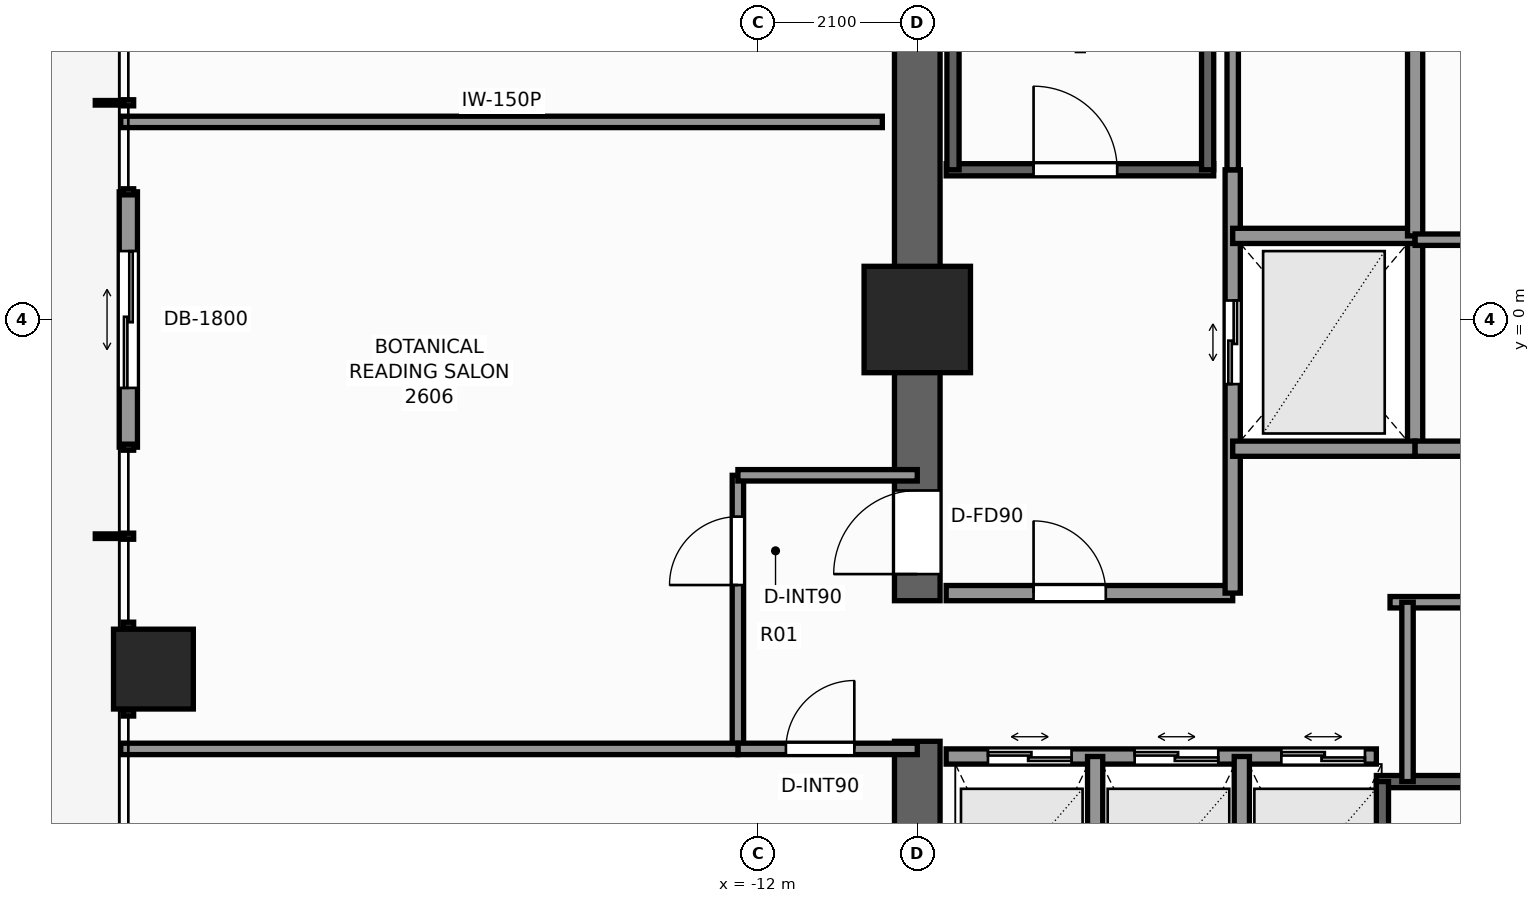
"""IFC4 building model, lengths in metres.
Left out: names, types, materials, properties, quantities, classifications, styles, units other than length and angle.
Written with IfcOpenShell. Run it as: python <this file> out.ifc"""

import sys

from ifc_helpers import new_model, si_unit, direction, frame, frame_2d, origin, origin_2d, place, context, subcontext, project, spatial, rectangle, extrude, element, fill, save


model = new_model("IFC4")
c1 = context("Model", 3, precision=1e-05, world=origin(), true_north=direction((0.0, 1.0)))
c2 = subcontext(c1, "Body", "Model", "MODEL_VIEW")
j1 = project(units=[si_unit("LENGTHUNIT", "METRE"), si_unit("PLANEANGLEUNIT", "RADIAN")], contexts=[c1])
p1 = place(None, origin())
s1 = spatial("IfcSite", under=j1, at=p1, CompositionType="ELEMENT")
p2 = place(p1, origin())
s2 = spatial("IfcBuilding", under=s1, at=p2, CompositionType="ELEMENT")
p3 = place(p2, frame((0.0, 0.0, 92.0)))
s3 = spatial("IfcBuildingStorey", under=s2, at=p3, CompositionType="ELEMENT", Elevation=92.0)
p4 = place(p3, frame((-9.9, -9.6, 0.0), z_axis=(0.0, 0.0, 1.0), x_axis=(0.0, 1.0, 0.0)))
e1 = element("IfcWall", 1, at=p4, inside=s3, PredefinedType="SHEAR", context=c2, shape_type="SweptSolid", body=[
    extrude(rectangle(XDim=4.05, YDim=0.6, at=frame_2d((2.025, 0.0))), origin(), (0.0, 0.0, 1.0), 3.3),
])
p5 = place(p3, frame((-9.9, -3.7, 0.0), z_axis=(0.0, 0.0, 1.0), x_axis=(0.0, 1.0, 0.0)))
e2 = element("IfcWall", 2, at=p5, inside=s3, PredefinedType="SHEAR", context=c2, shape_type="SweptSolid", body=[
    extrude(rectangle(XDim=13.3, YDim=0.6, at=frame_2d((6.65, 0.0))), origin(), (0.0, 0.0, 1.0), 3.3),
])
p6 = place(p5, frame((0.35, 0.0, 0.0)))
e3 = element("IfcOpeningElement", 3, at=p6, cuts=e2, PredefinedType="OPENING", context=c2, shape_type="SweptSolid", body=[
    extrude(rectangle(XDim=1.1, YDim=2.2, at=frame_2d((0.55, 1.1))), frame((0.0, 0.31, 0.0), z_axis=(0.0, -1.0, 0.0), x_axis=(1.0, 0.0, 0.0)), (0.0, 0.0, 1.0), 0.62),
])
p7 = place(p3, frame((-9.9, 0.0, 0.0), z_axis=(0.0, 0.0, 1.0), x_axis=(1.0, 0.0, 0.0)))
e4 = element("IfcColumn", 4, at=p7, inside=s3, PredefinedType="COLUMN", context=c2, shape_type="SweptSolid", body=[
    extrude(rectangle(XDim=1.4, YDim=1.4, at=origin_2d()), origin(), (0.0, 0.0, 1.0), 3.3),
])
p8 = place(p3, frame((-19.95, -4.6, 0.0), z_axis=(0.0, 0.0, 1.0), x_axis=(1.0, 0.0, 0.0)))
e5 = element("IfcColumn", 5, at=p8, inside=s3, PredefinedType="COLUMN", context=c2, shape_type="SweptSolid", body=[
    extrude(rectangle(XDim=1.05, YDim=1.05, at=origin_2d()), origin(), (0.0, 0.0, 1.0), 3.3),
])
p9 = place(p3, frame((-20.28, -1.68, 0.0), z_axis=(0.0, 0.0, 1.0), x_axis=(0.0, 1.0, 0.0)))
e6 = element("IfcWall", 6, at=p9, inside=s3, PredefinedType="STANDARD", context=c2, shape_type="SweptSolid", body=[
    extrude(rectangle(XDim=3.36, YDim=0.24, at=frame_2d((1.68, 0.0))), origin(), (0.0, 0.0, 1.0), 3.08),
])
p10 = place(p9, frame((0.78, 0.0, 0.0)))
e7 = element("IfcOpeningElement", 7, at=p10, cuts=e6, PredefinedType="OPENING", context=c2, shape_type="SweptSolid", body=[
    extrude(rectangle(XDim=1.8, YDim=2.2, at=frame_2d((0.9, 1.1))), frame((0.0, 0.13, 0.0), z_axis=(0.0, -1.0, 0.0), x_axis=(1.0, 0.0, 0.0)), (0.0, 0.0, 1.0), 0.26),
])
p11 = place(p3, frame((-9.52, 1.97, 0.0), z_axis=(0.0, 0.0, 1.0), x_axis=(1.0, 0.0, 0.0)))
e8 = element("IfcWall", 8, at=p11, inside=s3, PredefinedType="SHEAR", context=c2, shape_type="SweptSolid", body=[
    extrude(rectangle(XDim=3.52, YDim=0.16, at=frame_2d((1.76, 0.0))), origin(), (0.0, 0.0, 1.0), 3.3),
])
p12 = place(p11, frame((1.15, 0.0, 0.0)))
e9 = element("IfcOpeningElement", 9, at=p12, cuts=e8, PredefinedType="OPENING", context=c2, shape_type="SweptSolid", body=[
    extrude(rectangle(XDim=1.1, YDim=2.2, at=frame_2d((0.55, 1.1))), frame((0.0, 0.09, 0.0), z_axis=(0.0, -1.0, 0.0), x_axis=(1.0, 0.0, 0.0)), (0.0, 0.0, 1.0), 0.18),
])
for number, where, z_axis, x_axis in (
    (10, (-9.43, 1.97, 0.0), (0.0, 0.0, 1.0), (0.0, 1.0, 0.0)),
    (11, (-6.08, 1.97, 0.0), (0.0, 0.0, 1.0), (0.0, 1.0, 0.0)),
):
    element("IfcWall", number, at=place(p3, frame(where, z_axis=z_axis, x_axis=x_axis)), inside=s3, PredefinedType="SHEAR", context=c2, shape_type="SweptSolid", body=[
        extrude(rectangle(XDim=7.56, YDim=0.16, at=frame_2d((3.78, 0.0))), origin(), (0.0, 0.0, 1.0), 3.3),
    ])
p13 = place(p3, frame((-3.86, -6.08, 0.0), z_axis=(0.0, 0.0, 1.0), x_axis=(1.0, 0.0, 0.0)))
e12 = element("IfcWall", 12, at=p13, inside=s3, PredefinedType="SHEAR", context=c2, shape_type="SweptSolid", body=[
    extrude(rectangle(XDim=7.72, YDim=0.16, at=frame_2d((3.86, 0.0))), origin(), (0.0, 0.0, 1.0), 3.3),
])
p14 = place(p3, frame((-3.78, -9.43, 0.0), z_axis=(0.0, 0.0, 1.0), x_axis=(0.0, 1.0, 0.0)))
e13 = element("IfcWall", 13, at=p14, inside=s3, PredefinedType="SHEAR", context=c2, shape_type="SweptSolid", body=[
    extrude(rectangle(XDim=3.35, YDim=0.16, at=frame_2d((1.675, 0.0))), origin(), (0.0, 0.0, 1.0), 3.3),
])
p15 = place(p3, frame((-9.52, -3.6, 0.0), z_axis=(0.0, 0.0, 1.0), x_axis=(1.0, 0.0, 0.0)))
e14 = element("IfcWall", 14, at=p15, inside=s3, PredefinedType="SOLIDWALL", context=c2, shape_type="SweptSolid", body=[
    extrude(rectangle(XDim=3.77, YDim=0.2, at=frame_2d((1.885, 0.0))), origin(), (0.0, 0.0, 1.0), 3.08),
])
p16 = place(p15, frame((1.15, 0.0, 0.0)))
e15 = element("IfcOpeningElement", 15, at=p16, cuts=e14, PredefinedType="OPENING", context=c2, shape_type="SweptSolid", body=[
    extrude(rectangle(XDim=0.95, YDim=2.06, at=frame_2d((0.475, 1.03))), frame((0.0, 0.11, 0.0), z_axis=(0.0, -1.0, 0.0), x_axis=(1.0, 0.0, 0.0)), (0.0, 0.0, 1.0), 0.22),
])
p17 = place(p3, frame((-5.75, -3.6, 0.0), z_axis=(0.0, 0.0, 1.0), x_axis=(0.0, 1.0, 0.0)))
e16 = element("IfcWall", 16, at=p17, inside=s3, PredefinedType="SOLIDWALL", context=c2, shape_type="SweptSolid", body=[
    extrude(rectangle(XDim=5.57, YDim=0.2, at=frame_2d((2.785, 0.0))), origin(), (0.0, 0.0, 1.0), 3.08),
])
p18 = place(p17, frame((2.75, 0.0, 0.0)))
e17 = element("IfcOpeningElement", 17, at=p18, cuts=e16, PredefinedType="OPENING", context=c2, shape_type="SweptSolid", body=[
    extrude(rectangle(XDim=1.1, YDim=2.2, at=frame_2d((0.55, 1.1))), frame((0.0, 0.11, 0.0), z_axis=(0.0, -1.0, 0.0), x_axis=(1.0, 0.0, 0.0)), (0.0, 0.0, 1.0), 0.22),
])
p19 = place(p3, frame((-3.35, -1.7, 0.0), z_axis=(0.0, 0.0, 1.0), x_axis=(0.0, 1.0, 0.0)))
e18 = element("IfcWall", 18, at=p19, inside=s3, PredefinedType="SOLIDWALL", context=c2, shape_type="SweptSolid", body=[
    extrude(rectangle(XDim=2.8, YDim=0.2, at=frame_2d((1.4, 0.0))), origin(), (0.0, 0.0, 1.0), 3.08),
])
for number, where, z_axis, x_axis in (
    (19, (-5.75, -1.7, 0.0), (0.0, 0.0, 1.0), (1.0, 0.0, 0.0)),
    (20, (-5.75, 1.1, 0.0), (0.0, 0.0, 1.0), (1.0, 0.0, 0.0)),
):
    element("IfcWall", number, at=place(p3, frame(where, z_axis=z_axis, x_axis=x_axis)), inside=s3, PredefinedType="SOLIDWALL", context=c2, shape_type="SweptSolid", body=[
        extrude(rectangle(XDim=2.4, YDim=0.2, at=frame_2d((1.2, 0.0))), origin(), (0.0, 0.0, 1.0), 3.08),
    ])
p20 = place(p3, frame((-9.52, -5.75, 0.0), z_axis=(0.0, 0.0, 1.0), x_axis=(1.0, 0.0, 0.0)))
e21 = element("IfcWall", 21, at=p20, inside=s3, PredefinedType="SOLIDWALL", context=c2, shape_type="SweptSolid", body=[
    extrude(rectangle(XDim=5.66, YDim=0.2, at=frame_2d((2.83, 0.0))), origin(), (0.0, 0.0, 1.0), 3.08),
])
p21 = place(p20, frame((0.55, 0.0, 0.0)))
e22 = element("IfcOpeningElement", 22, at=p21, cuts=e21, PredefinedType="OPENING", context=c2, shape_type="SweptSolid", body=[
    extrude(rectangle(XDim=1.1, YDim=2.2, at=frame_2d((0.55, 1.1))), frame((0.0, 0.11, 0.0), z_axis=(0.0, -1.0, 0.0), x_axis=(1.0, 0.0, 0.0)), (0.0, 0.0, 1.0), 0.22),
])
p22 = place(p20, frame((2.48, 0.0, 0.0)))
e23 = element("IfcOpeningElement", 23, at=p22, cuts=e21, PredefinedType="OPENING", context=c2, shape_type="SweptSolid", body=[
    extrude(rectangle(XDim=1.1, YDim=2.2, at=frame_2d((0.55, 1.1))), frame((0.0, 0.11, 0.0), z_axis=(0.0, -1.0, 0.0), x_axis=(1.0, 0.0, 0.0)), (0.0, 0.0, 1.0), 0.22),
])
p23 = place(p20, frame((4.41, 0.0, 0.0)))
e24 = element("IfcOpeningElement", 24, at=p23, cuts=e21, PredefinedType="OPENING", context=c2, shape_type="SweptSolid", body=[
    extrude(rectangle(XDim=1.1, YDim=2.2, at=frame_2d((0.55, 1.1))), frame((0.0, 0.11, 0.0), z_axis=(0.0, -1.0, 0.0), x_axis=(1.0, 0.0, 0.0)), (0.0, 0.0, 1.0), 0.22),
])
for number, where, z_axis, x_axis in (
    (25, (-7.56, -9.52, 0.0), (0.0, 0.0, 1.0), (0.0, 1.0, 0.0)),
    (26, (-5.63, -9.52, 0.0), (0.0, 0.0, 1.0), (0.0, 1.0, 0.0)),
):
    element("IfcWall", number, at=place(p3, frame(where, z_axis=z_axis, x_axis=x_axis)), inside=s3, PredefinedType="SOLIDWALL", context=c2, shape_type="SweptSolid", body=[
        extrude(rectangle(XDim=3.77, YDim=0.2, at=frame_2d((1.885, 0.0))), origin(), (0.0, 0.0, 1.0), 3.08),
    ])
p24 = place(p3, frame((-3.35, -1.7, 0.0), z_axis=(0.0, 0.0, 1.0), x_axis=(1.0, 0.0, 0.0)))
e27 = element("IfcWall", 27, at=p24, inside=s3, PredefinedType="SOLIDWALL", context=c2, shape_type="SweptSolid", body=[
    extrude(rectangle(XDim=6.7, YDim=0.2, at=frame_2d((3.35, 0.0))), origin(), (0.0, 0.0, 1.0), 3.08),
])
p25 = place(p3, frame((-3.35, 1.1, 0.0), z_axis=(0.0, 0.0, 1.0), x_axis=(0.0, 1.0, 0.0)))
e28 = element("IfcWall", 28, at=p25, inside=s3, PredefinedType="SOLIDWALL", context=c2, shape_type="SweptSolid", body=[
    extrude(rectangle(XDim=3.2, YDim=0.2, at=frame_2d((1.6, 0.0))), origin(), (0.0, 0.0, 1.0), 3.08),
])
p26 = place(p3, frame((-3.35, 1.05, 0.0), z_axis=(0.0, 0.0, 1.0), x_axis=(1.0, 0.0, 0.0)))
e29 = element("IfcWall", 29, at=p26, inside=s3, PredefinedType="PARTITIONING", context=c2, shape_type="SweptSolid", body=[
    extrude(rectangle(XDim=6.7, YDim=0.15, at=frame_2d((3.35, 0.0))), origin(), (0.0, 0.0, 1.0), 3.08),
])
p27 = place(p26, frame((4.2, 0.0, 0.0)))
e30 = element("IfcOpeningElement", 30, at=p27, cuts=e29, PredefinedType="OPENING", context=c2, shape_type="SweptSolid", body=[
    extrude(rectangle(XDim=0.85, YDim=2.03, at=frame_2d((0.425, 1.015))), frame((0.0, 0.085, 0.0), z_axis=(0.0, -1.0, 0.0), x_axis=(1.0, 0.0, 0.0)), (0.0, 0.0, 1.0), 0.17),
])
p28 = place(p3, frame((-3.68, -3.72, 0.0), z_axis=(0.0, 0.0, 1.0), x_axis=(1.0, 0.0, 0.0)))
e31 = element("IfcWall", 31, at=p28, inside=s3, PredefinedType="PARTITIONING", context=c2, shape_type="SweptSolid", body=[
    extrude(rectangle(XDim=7.36, YDim=0.15, at=frame_2d((3.68, 0.0))), origin(), (0.0, 0.0, 1.0), 3.08),
])
p29 = place(p3, frame((-3.45, -6.08, 0.0), z_axis=(0.0, 0.0, 1.0), x_axis=(0.0, 1.0, 0.0)))
e32 = element("IfcWall", 32, at=p29, inside=s3, PredefinedType="PARTITIONING", context=c2, shape_type="SweptSolid", body=[
    extrude(rectangle(XDim=2.36, YDim=0.15, at=frame_2d((1.18, 0.0))), origin(), (0.0, 0.0, 1.0), 3.08),
])
p30 = place(p3, frame((-5.75, 1.97, 0.0), z_axis=(0.0, 0.0, 1.0), x_axis=(0.0, 1.0, 0.0)))
e33 = element("IfcWall", 33, at=p30, inside=s3, PredefinedType="PARTITIONING", context=c2, shape_type="SweptSolid", body=[
    extrude(rectangle(XDim=2.33, YDim=0.15, at=frame_2d((1.165, 0.0))), origin(), (0.0, 0.0, 1.0), 3.08),
])
p31 = place(p3, frame((-12.26, -5.65, 0.0), z_axis=(0.0, 0.0, 1.0), x_axis=(0.0, 1.0, 0.0)))
e34 = element("IfcWall", 34, at=p31, inside=s3, PredefinedType="PARTITIONING", context=c2, shape_type="SweptSolid", body=[
    extrude(rectangle(XDim=3.6, YDim=0.15, at=frame_2d((1.8, 0.0))), origin(), (0.0, 0.0, 1.0), 2.292),
])
p32 = place(p31, frame((2.156, 0.0, 0.0)))
e35 = element("IfcOpeningElement", 35, at=p32, cuts=e34, PredefinedType="OPENING", context=c2, shape_type="SweptSolid", body=[
    extrude(rectangle(XDim=0.9, YDim=2.06, at=frame_2d((0.45, 1.03))), frame((0.0, 0.085, 0.0), z_axis=(0.0, -1.0, 0.0), x_axis=(1.0, 0.0, 0.0)), (0.0, 0.0, 1.0), 0.17),
])
p33 = place(p3, frame((-12.26, -2.05, 0.0), z_axis=(0.0, 0.0, 1.0), x_axis=(1.0, 0.0, 0.0)))
e36 = element("IfcWall", 36, at=p33, inside=s3, PredefinedType="PARTITIONING", context=c2, shape_type="SweptSolid", body=[
    extrude(rectangle(XDim=2.36, YDim=0.15, at=frame_2d((1.18, 0.0))), origin(), (0.0, 0.0, 1.0), 3.08),
])
p34 = place(p3, frame((-12.26, -5.65, 0.0), z_axis=(0.0, 0.0, 1.0), x_axis=(1.0, 0.0, 0.0)))
e37 = element("IfcWall", 37, at=p34, inside=s3, PredefinedType="PARTITIONING", context=c2, shape_type="SweptSolid", body=[
    extrude(rectangle(XDim=2.36, YDim=0.15, at=frame_2d((1.18, 0.0))), origin(), (0.0, 0.0, 1.0), 3.08),
])
p35 = place(p34, frame((0.632, 0.0, 0.0)))
e38 = element("IfcOpeningElement", 38, at=p35, cuts=e37, PredefinedType="OPENING", context=c2, shape_type="SweptSolid", body=[
    extrude(rectangle(XDim=0.9, YDim=2.06, at=frame_2d((0.45, 1.03))), frame((0.0, 0.085, 0.0), z_axis=(0.0, -1.0, 0.0), x_axis=(1.0, 0.0, 0.0)), (0.0, 0.0, 1.0), 0.17),
])
p36 = place(p3, frame((-20.38, 2.6, 0.0), z_axis=(0.0, 0.0, 1.0), x_axis=(1.0, 0.0, 0.0)))
e39 = element("IfcWall", 39, at=p36, inside=s3, PredefinedType="PARTITIONING", context=c2, shape_type="SweptSolid", body=[
    extrude(rectangle(XDim=10.02, YDim=0.15, at=frame_2d((5.01, 0.0))), origin(), (0.0, 0.0, 1.0), 2.449),
])
p37 = place(p3, frame((-20.38, -5.65, 0.0), z_axis=(0.0, 0.0, 1.0), x_axis=(1.0, 0.0, 0.0)))
e40 = element("IfcWall", 40, at=p37, inside=s3, PredefinedType="PARTITIONING", context=c2, shape_type="SweptSolid", body=[
    extrude(rectangle(XDim=8.12, YDim=0.15, at=frame_2d((4.06, 0.0))), origin(), (0.0, 0.0, 1.0), 2.449),
])
p38 = place(p10, origin())
e41 = element("IfcDoor", 41, at=p38, inside=s3, OperationType="DOUBLE_DOOR_SLIDING", PredefinedType="DOOR", context=c2, shape_type="SweptSolid", body=[
    extrude(rectangle(XDim=1.8, YDim=2.2, at=frame_2d((0.9, 1.1))), frame((0.0, 0.025, 0.0), z_axis=(0.0, -1.0, 0.0), x_axis=(1.0, 0.0, 0.0)), (0.0, 0.0, 1.0), 0.05),
])
fill(e7, e41)
p39 = place(p12, origin())
e42 = element("IfcDoor", 42, at=p39, inside=s3, OperationType="SINGLE_SWING_LEFT", PredefinedType="DOOR", context=c2, shape_type="SweptSolid", body=[
    extrude(rectangle(XDim=1.1, YDim=2.2, at=frame_2d((0.55, 1.1))), frame((0.0, 0.025, 0.0), z_axis=(0.0, -1.0, 0.0), x_axis=(1.0, 0.0, 0.0)), (0.0, 0.0, 1.0), 0.05),
])
fill(e9, e42)
p40 = place(p6, origin())
e43 = element("IfcDoor", 43, at=p40, inside=s3, OperationType="SINGLE_SWING_LEFT", PredefinedType="DOOR", context=c2, shape_type="SweptSolid", body=[
    extrude(rectangle(XDim=1.1, YDim=2.2, at=frame_2d((0.55, 1.1))), frame((0.0, 0.025, 0.0), z_axis=(0.0, -1.0, 0.0), x_axis=(1.0, 0.0, 0.0)), (0.0, 0.0, 1.0), 0.05),
])
fill(e3, e43)
p41 = place(p18, origin())
e44 = element("IfcDoor", 44, at=p41, inside=s3, OperationType="DOUBLE_DOOR_SLIDING", PredefinedType="DOOR", context=c2, shape_type="SweptSolid", body=[
    extrude(rectangle(XDim=1.1, YDim=2.2, at=frame_2d((0.55, 1.1))), frame((0.0, 0.025, 0.0), z_axis=(0.0, -1.0, 0.0), x_axis=(1.0, 0.0, 0.0)), (0.0, 0.0, 1.0), 0.05),
])
fill(e17, e44)
p42 = place(p21, origin())
e45 = element("IfcDoor", 45, at=p42, inside=s3, OperationType="DOUBLE_DOOR_SLIDING", PredefinedType="DOOR", context=c2, shape_type="SweptSolid", body=[
    extrude(rectangle(XDim=1.1, YDim=2.2, at=frame_2d((0.55, 1.1))), frame((0.0, 0.025, 0.0), z_axis=(0.0, -1.0, 0.0), x_axis=(1.0, 0.0, 0.0)), (0.0, 0.0, 1.0), 0.05),
])
fill(e22, e45)
p43 = place(p22, origin())
e46 = element("IfcDoor", 46, at=p43, inside=s3, OperationType="DOUBLE_DOOR_SLIDING", PredefinedType="DOOR", context=c2, shape_type="SweptSolid", body=[
    extrude(rectangle(XDim=1.1, YDim=2.2, at=frame_2d((0.55, 1.1))), frame((0.0, 0.025, 0.0), z_axis=(0.0, -1.0, 0.0), x_axis=(1.0, 0.0, 0.0)), (0.0, 0.0, 1.0), 0.05),
])
fill(e23, e46)
p44 = place(p23, origin())
e47 = element("IfcDoor", 47, at=p44, inside=s3, OperationType="DOUBLE_DOOR_SLIDING", PredefinedType="DOOR", context=c2, shape_type="SweptSolid", body=[
    extrude(rectangle(XDim=1.1, YDim=2.2, at=frame_2d((0.55, 1.1))), frame((0.0, 0.025, 0.0), z_axis=(0.0, -1.0, 0.0), x_axis=(1.0, 0.0, 0.0)), (0.0, 0.0, 1.0), 0.05),
])
fill(e24, e47)
p45 = place(p16, origin())
e48 = element("IfcDoor", 48, at=p45, inside=s3, OperationType="SINGLE_SWING_LEFT", PredefinedType="DOOR", context=c2, shape_type="SweptSolid", body=[
    extrude(rectangle(XDim=0.95, YDim=2.06, at=frame_2d((0.475, 1.03))), frame((0.0, 0.025, 0.0), z_axis=(0.0, -1.0, 0.0), x_axis=(1.0, 0.0, 0.0)), (0.0, 0.0, 1.0), 0.05),
])
fill(e15, e48)
p46 = place(p32, origin())
e49 = element("IfcDoor", 49, at=p46, inside=s3, OperationType="SINGLE_SWING_LEFT", PredefinedType="DOOR", context=c2, shape_type="SweptSolid", body=[
    extrude(rectangle(XDim=0.9, YDim=2.06, at=frame_2d((0.45, 1.03))), frame((0.0, 0.025, 0.0), z_axis=(0.0, -1.0, 0.0), x_axis=(1.0, 0.0, 0.0)), (0.0, 0.0, 1.0), 0.05),
])
fill(e35, e49)
p47 = place(p35, origin())
e50 = element("IfcDoor", 50, at=p47, inside=s3, OperationType="SINGLE_SWING_RIGHT", PredefinedType="DOOR", context=c2, shape_type="SweptSolid", body=[
    extrude(rectangle(XDim=0.9, YDim=2.06, at=frame_2d((0.45, 1.03))), frame((0.0, 0.025, 0.0), z_axis=(0.0, -1.0, 0.0), x_axis=(1.0, 0.0, 0.0)), (0.0, 0.0, 1.0), 0.05),
])
fill(e38, e50)
save(model, sys.argv[1])
